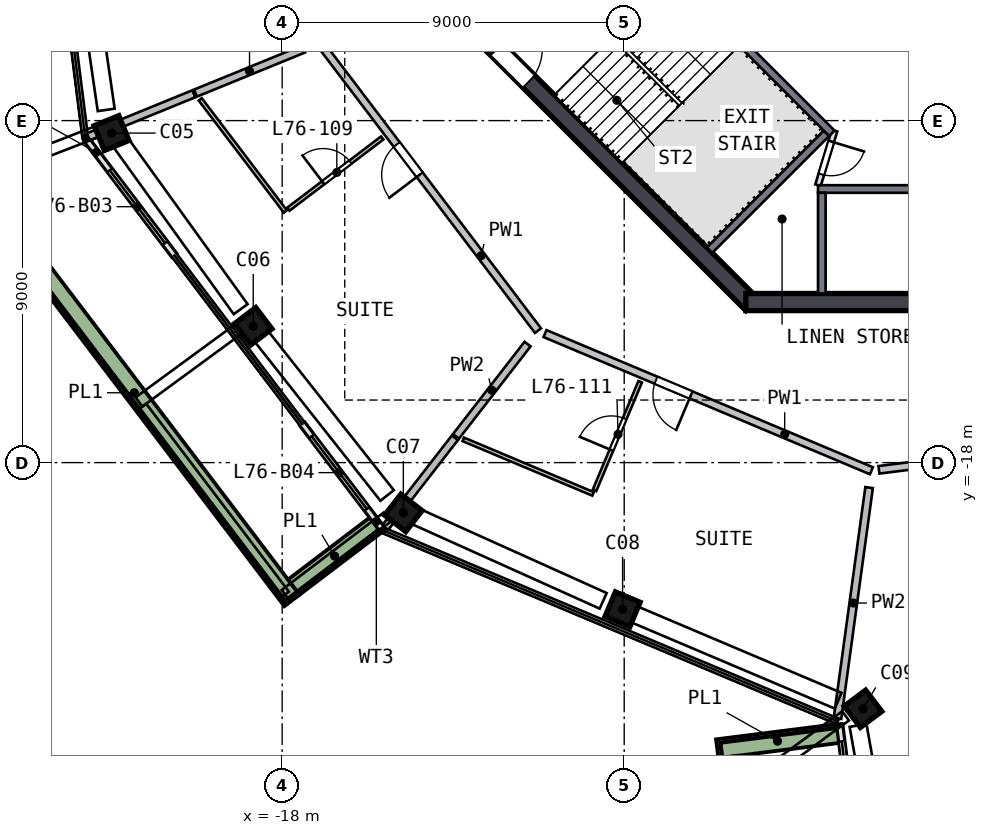
"""IFC4 building model, lengths in metres.
Left out: names, types, materials, properties, quantities, classifications, styles, units other than length and angle.
Written with IfcOpenShell. Run it as: python <this file> out.ifc"""

import sys

from ifc_helpers import new_model, si_unit, direction, frame, frame_2d, origin, origin_2d, place, context, subcontext, project, spatial, rectangle, extrude, element, fill, save


model = new_model("IFC4")
c1 = context("Model", 3, precision=1e-05, world=origin(), true_north=direction((0.0, 1.0)))
c2 = subcontext(c1, "Body", "Model", "MODEL_VIEW")
j1 = project(units=[si_unit("LENGTHUNIT", "METRE"), si_unit("PLANEANGLEUNIT", "RADIAN")], contexts=[c1])
p1 = place(None, origin())
s1 = spatial("IfcSite", under=j1, at=p1, CompositionType="ELEMENT")
p2 = place(p1, origin())
s2 = spatial("IfcBuilding", under=s1, at=p2, CompositionType="ELEMENT")
p3 = place(p2, frame((0.0, 0.0, 306.5)))
s3 = spatial("IfcBuildingStorey", under=s2, at=p3, CompositionType="ELEMENT", Elevation=306.5)
p4 = place(p3, frame((-22.543, -9.2, 0.0), z_axis=(0.044699629, -0.106807786, 0.993274403), x_axis=(-0.375670486, 0.91949262, 0.115779992)))
e1 = element("IfcColumn", 1, at=p4, inside=s3, PredefinedType="COLUMN", context=c2, shape_type="SweptSolid", body=[
    extrude(rectangle(XDim=0.7, YDim=0.7, at=origin_2d()), origin(), (0.0, 0.0, 1.0), 3.211),
])
p5 = place(p3, frame((-18.844, -14.304, 0.0), z_axis=(0.068747968, -0.089052954, 0.993651492), x_axis=(0.600506692, -0.791666534, -0.112498053)))
e2 = element("IfcColumn", 2, at=p5, inside=s3, PredefinedType="COLUMN", context=c2, shape_type="SweptSolid", body=[
    extrude(rectangle(XDim=0.7, YDim=0.7, at=origin_2d()), origin(), (0.0, 0.0, 1.0), 3.21),
])
p6 = place(p3, frame((-14.923, -19.239, 0.0), z_axis=(0.092135676, -0.07016603, 0.993271235), x_axis=(-0.785076565, 0.608476364, 0.11580717)))
e3 = element("IfcColumn", 3, at=p6, inside=s3, PredefinedType="COLUMN", context=c2, shape_type="SweptSolid", body=[
    extrude(rectangle(XDim=0.7, YDim=0.7, at=origin_2d()), origin(), (0.0, 0.0, 1.0), 3.212),
])
p7 = place(p3, frame((-9.168, -21.81, 0.0), z_axis=(0.104110118, -0.042739143, 0.993647044), x_axis=(0.915971714, -0.385137856, -0.11253733)))
e4 = element("IfcColumn", 4, at=p7, inside=s3, PredefinedType="COLUMN", context=c2, shape_type="SweptSolid", body=[
    extrude(rectangle(XDim=0.7, YDim=0.7, at=origin_2d()), origin(), (0.0, 0.0, 1.0), 3.21),
])
p8 = place(p3, frame((-2.856, -24.463, 0.0), z_axis=(0.116368879, -0.012617396, 0.993125916), x_axis=(-0.59706483, 0.798183786, 0.08010139)))
e5 = element("IfcColumn", 5, at=p8, inside=s3, PredefinedType="COLUMN", context=c2, shape_type="SweptSolid", body=[
    extrude(rectangle(XDim=0.7, YDim=0.7, at=origin_2d()), origin(), (0.0, 0.0, 1.0), 3.212),
])
p9 = place(p3, frame((-13.841, -5.64, 0.0), z_axis=(0.0, 0.0, 1.0), x_axis=(0.707106781, -0.707106781, 0.0)))
e6 = element("IfcWall", 6, at=p9, inside=s3, PredefinedType="SHEAR", context=c2, shape_type="SweptSolid", body=[
    extrude(rectangle(XDim=11.598, YDim=0.45, at=frame_2d((5.799, 0.0))), origin(), (0.0, 0.0, 1.0), 3.5),
])
p10 = place(p9, frame((2.099, 0.0, 0.0)))
e7 = element("IfcOpeningElement", 7, at=p10, cuts=e6, PredefinedType="OPENING", context=c2, shape_type="SweptSolid", body=[
    extrude(rectangle(XDim=1.2, YDim=2.1, at=frame_2d((0.6, 1.05))), frame((0.0, 0.235, 0.0), z_axis=(0.0, -1.0, 0.0), x_axis=(1.0, 0.0, 0.0)), (0.0, 0.0, 1.0), 0.47),
])
p11 = place(p3, frame((-5.799, -13.775, 0.0), z_axis=(0.0, 0.0, 1.0), x_axis=(1.0, 0.0, 0.0)))
e8 = element("IfcWall", 8, at=p11, inside=s3, PredefinedType="SHEAR", context=c2, shape_type="SweptSolid", body=[
    extrude(rectangle(XDim=11.598, YDim=0.45, at=frame_2d((5.799, 0.0))), origin(), (0.0, 0.0, 1.0), 3.5),
])
p12 = place(p3, frame((-23.132, -9.524, 0.0), z_axis=(0.0, 0.0, 1.0), x_axis=(0.604631987, -0.796504966, 0.0)))
e9 = element("IfcWall", 9, at=p12, inside=s3, PredefinedType="SOLIDWALL", context=c2, shape_type="SweptSolid", body=[
    extrude(rectangle(XDim=3.787, YDim=0.15, at=frame_2d((1.893, 0.0))), origin(), (0.0, 0.0, 1.0), 2.525),
])
p13 = place(p12, frame((0.987, 0.0, 0.0)))
e10 = element("IfcOpeningElement", 10, at=p13, cuts=e9, PredefinedType="OPENING", context=c2, shape_type="SweptSolid", body=[
    extrude(rectangle(XDim=2.4, YDim=2.4, at=frame_2d((1.2, 1.2))), frame((0.0, 0.085, 0.0), z_axis=(0.0, -1.0, 0.0), x_axis=(1.0, 0.0, 0.0)), (0.0, 0.0, 1.0), 0.17),
])
p14 = place(p3, frame((-17.465, -16.989, 0.0), z_axis=(0.0, 0.0, 1.0), x_axis=(0.604640614, -0.796498417, 0.0)))
e11 = element("IfcWall", 11, at=p14, inside=s3, PredefinedType="SOLIDWALL", context=c2, shape_type="SweptSolid", body=[
    extrude(rectangle(XDim=3.427, YDim=0.15, at=frame_2d((1.713, 0.0))), origin(), (0.0, 0.0, 1.0), 2.525),
])
p15 = place(p14, frame((0.4, 0.0, 0.0)))
e12 = element("IfcOpeningElement", 12, at=p15, cuts=e11, PredefinedType="OPENING", context=c2, shape_type="SweptSolid", body=[
    extrude(rectangle(XDim=2.4, YDim=2.4, at=frame_2d((1.2, 1.2))), frame((0.0, 0.085, 0.0), z_axis=(0.0, -1.0, 0.0), x_axis=(1.0, 0.0, 0.0)), (0.0, 0.0, 1.0), 0.17),
])
p16 = place(p3, frame((-3.325, -24.942, 0.0), z_axis=(0.0, 0.0, 1.0), x_axis=(0.125349211, -0.992112683, 0.0)))
e13 = element("IfcWall", 13, at=p16, inside=s3, PredefinedType="SOLIDWALL", context=c2, shape_type="SweptSolid", body=[
    extrude(rectangle(XDim=3.2, YDim=0.15, at=frame_2d((1.6, 0.0))), origin(), (0.0, 0.0, 1.0), 2.525),
])
p17 = place(p16, frame((0.4, 0.0, 0.0)))
e14 = element("IfcOpeningElement", 14, at=p17, cuts=e13, PredefinedType="OPENING", context=c2, shape_type="SweptSolid", body=[
    extrude(rectangle(XDim=2.4, YDim=2.4, at=frame_2d((1.2, 1.2))), frame((0.0, 0.085, 0.0), z_axis=(0.0, -1.0, 0.0), x_axis=(1.0, 0.0, 0.0)), (0.0, 0.0, 1.0), 0.17),
])
p18 = place(p3, frame((-26.04, -10.697, 0.0), z_axis=(0.0, 0.0, 1.0), x_axis=(0.604595551, -0.796532623, 0.0)))
e15 = element("IfcWall", 15, at=p18, inside=s3, PredefinedType="SOLIDWALL", context=c2, shape_type="SweptSolid", body=[
    extrude(rectangle(XDim=13.723, YDim=0.5, at=frame_2d((6.862, 0.0))), origin(), (0.0, 0.0, 1.0), 0.7),
])
p19 = place(p3, frame((-17.694, -21.277, 0.0), z_axis=(0.0, 0.0, 1.0), x_axis=(0.79653505, 0.604592354, 0.0)))
e16 = element("IfcWall", 16, at=p19, inside=s3, PredefinedType="SOLIDWALL", context=c2, shape_type="SweptSolid", body=[
    extrude(rectangle(XDim=2.699, YDim=0.5, at=frame_2d((1.35, 0.0))), origin(), (0.0, 0.0, 1.0), 0.7),
])
p20 = place(p3, frame((-3.378, -25.13, 0.0), z_axis=(0.0, 0.0, 1.0), x_axis=(-0.992117376, -0.125312056, 0.0)))
e17 = element("IfcWall", 17, at=p20, inside=s3, PredefinedType="SOLIDWALL", context=c2, shape_type="SweptSolid", body=[
    extrude(rectangle(XDim=3.199, YDim=0.5, at=frame_2d((1.6, 0.0))), origin(), (0.0, 0.0, 1.0), 0.7),
])
p21 = place(p3, frame((-3.9, -10.8, 0.0), z_axis=(0.0, 0.0, 1.0), x_axis=(1.0, 0.0, 0.0)))
e18 = element("IfcWall", 18, at=p21, inside=s3, PredefinedType="SOLIDWALL", context=c2, shape_type="SweptSolid", body=[
    extrude(rectangle(XDim=7.8, YDim=0.2, at=frame_2d((3.9, 0.0))), origin(), (0.0, 0.0, 1.0), 3.19),
])
p22 = place(p21, frame((3.45, 0.0, 0.0)))
e19 = element("IfcOpeningElement", 19, at=p22, cuts=e18, PredefinedType="OPENING", context=c2, shape_type="SweptSolid", body=[
    extrude(rectangle(XDim=0.9, YDim=2.1, at=frame_2d((0.45, 1.05))), frame((0.0, 0.11, 0.0), z_axis=(0.0, -1.0, 0.0), x_axis=(1.0, 0.0, 0.0)), (0.0, 0.0, 1.0), 0.22),
])
p23 = place(p3, frame((-3.8, -10.9, 0.0), z_axis=(0.0, 0.0, 1.0), x_axis=(0.0, -1.0, 0.0)))
e20 = element("IfcWall", 20, at=p23, inside=s3, PredefinedType="SOLIDWALL", context=c2, shape_type="SweptSolid", body=[
    extrude(rectangle(XDim=2.65, YDim=0.2, at=frame_2d((1.325, 0.0))), origin(), (0.0, 0.0, 1.0), 3.19),
])
p24 = place(p3, frame((-3.535, -9.334, 0.0), z_axis=(0.0, 0.0, 1.0), x_axis=(-0.707120946, 0.707092617, 0.0)))
e21 = element("IfcWall", 21, at=p24, inside=s3, PredefinedType="SOLIDWALL", context=c2, shape_type="SweptSolid", body=[
    extrude(rectangle(XDim=8.618, YDim=0.2, at=frame_2d((4.309, 0.0))), origin(), (0.0, 0.0, 1.0), 3.19),
])
p25 = place(p24, frame((6.6, 0.0, 0.0)))
e22 = element("IfcOpeningElement", 22, at=p25, cuts=e21, PredefinedType="OPENING", context=c2, shape_type="SweptSolid", body=[
    extrude(rectangle(XDim=1.2, YDim=2.1, at=frame_2d((0.6, 1.05))), frame((0.0, 0.11, 0.0), z_axis=(0.0, -1.0, 0.0), x_axis=(1.0, 0.0, 0.0)), (0.0, 0.0, 1.0), 0.22),
])
p26 = place(p3, frame((-3.677, -9.334, 0.0), z_axis=(0.0, 0.0, 1.0), x_axis=(-0.707106781, -0.707106781, 0.0)))
e23 = element("IfcWall", 23, at=p26, inside=s3, PredefinedType="SOLIDWALL", context=c2, shape_type="SweptSolid", body=[
    extrude(rectangle(XDim=4.35, YDim=0.2, at=frame_2d((2.175, 0.0))), origin(), (0.0, 0.0, 1.0), 3.19),
])
p27 = place(p3, frame((-3.465, -9.263, 0.0), z_axis=(0.0, 0.0, 1.0), x_axis=(-0.289808785, -0.957084567, 0.0)))
e24 = element("IfcWall", 24, at=p27, inside=s3, PredefinedType="PARTITIONING", context=c2, shape_type="SweptSolid", body=[
    extrude(rectangle(XDim=1.501, YDim=0.15, at=frame_2d((0.75, 0.0))), origin(), (0.0, 0.0, 1.0), 3.19),
])
p28 = place(p27, frame((0.301, 0.0, 0.0)))
e25 = element("IfcOpeningElement", 25, at=p28, cuts=e24, PredefinedType="OPENING", context=c2, shape_type="SweptSolid", body=[
    extrude(rectangle(XDim=0.9, YDim=2.1, at=frame_2d((0.45, 1.05))), frame((0.0, 0.085, 0.0), z_axis=(0.0, -1.0, 0.0), x_axis=(1.0, 0.0, 0.0)), (0.0, 0.0, 1.0), 0.17),
])
p29 = place(p3, frame((-11.268, -14.527, 0.0), z_axis=(0.0, 0.0, 1.0), x_axis=(-0.604585485, 0.796540263, 0.0)))
e26 = element("IfcWall", 26, at=p29, inside=s3, PredefinedType="SOLIDWALL", context=c2, shape_type="SweptSolid", body=[
    extrude(rectangle(XDim=9.316, YDim=0.2, at=frame_2d((4.658, 0.0))), origin(), (0.0, 0.0, 1.0), 3.19),
])
p30 = place(p29, frame((5.15, 0.0, 0.0)))
e27 = element("IfcOpeningElement", 27, at=p30, cuts=e26, PredefinedType="OPENING", context=c2, shape_type="SweptSolid", body=[
    extrude(rectangle(XDim=1.0, YDim=2.1, at=frame_2d((0.5, 1.05))), frame((0.0, 0.11, 0.0), z_axis=(0.0, -1.0, 0.0), x_axis=(1.0, 0.0, 0.0)), (0.0, 0.0, 1.0), 0.22),
])
p31 = place(p3, frame((-2.495, -18.215, 0.0), z_axis=(0.0, 0.0, 1.0), x_axis=(-0.921862121, 0.387518038, 0.0)))
e28 = element("IfcWall", 28, at=p31, inside=s3, PredefinedType="SOLIDWALL", context=c2, shape_type="SweptSolid", body=[
    extrude(rectangle(XDim=9.317, YDim=0.2, at=frame_2d((4.658, 0.0))), origin(), (0.0, 0.0, 1.0), 3.19),
])
p32 = place(p31, frame((5.15, 0.0, 0.0)))
e29 = element("IfcOpeningElement", 29, at=p32, cuts=e28, PredefinedType="OPENING", context=c2, shape_type="SweptSolid", body=[
    extrude(rectangle(XDim=1.0, YDim=2.1, at=frame_2d((0.5, 1.05))), frame((0.0, 0.11, 0.0), z_axis=(0.0, -1.0, 0.0), x_axis=(1.0, 0.0, 0.0)), (0.0, 0.0, 1.0), 0.22),
])
p33 = place(p3, frame((6.947, -17.022, 0.0), z_axis=(0.0, 0.0, 1.0), x_axis=(-0.992114148, -0.125337611, 0.0)))
e30 = element("IfcWall", 30, at=p33, inside=s3, PredefinedType="SOLIDWALL", context=c2, shape_type="SweptSolid", body=[
    extrude(rectangle(XDim=9.317, YDim=0.2, at=frame_2d((4.658, 0.0))), origin(), (0.0, 0.0, 1.0), 3.19),
])
p34 = place(p33, frame((3.834, 0.0, 0.0)))
e31 = element("IfcOpeningElement", 31, at=p34, cuts=e30, PredefinedType="OPENING", context=c2, shape_type="SweptSolid", body=[
    extrude(rectangle(XDim=1.8, YDim=2.1, at=frame_2d((0.9, 1.05))), frame((0.0, 0.11, 0.0), z_axis=(0.0, -1.0, 0.0), x_axis=(1.0, 0.0, 0.0)), (0.0, 0.0, 1.0), 0.22),
])
p35 = place(p3, frame((-20.325, -8.295, 0.0), z_axis=(0.0, 0.0, 1.0), x_axis=(-0.925893946, -0.377783538, 0.0)))
e32 = element("IfcWall", 32, at=p35, inside=s3, PredefinedType="SOLIDWALL", context=c2, shape_type="SweptSolid", body=[
    extrude(rectangle(XDim=3.011, YDim=0.2, at=frame_2d((1.506, 0.0))), origin(), (0.0, 0.0, 1.0), 3.19),
])
p36 = place(p3, frame((-17.436, -7.115, 0.0), z_axis=(0.0, 0.0, 1.0), x_axis=(-0.925880525, -0.377816427, 0.0)))
e33 = element("IfcWall", 33, at=p36, inside=s3, PredefinedType="SOLIDWALL", context=c2, shape_type="SweptSolid", body=[
    extrude(rectangle(XDim=3.074, YDim=0.2, at=frame_2d((1.537, 0.0))), origin(), (0.0, 0.0, 1.0), 3.19),
])
p37 = place(p3, frame((-13.455, -17.346, 0.0), z_axis=(0.0, 0.0, 1.0), x_axis=(-0.612918568, -0.79014608, 0.0)))
e34 = element("IfcWall", 34, at=p37, inside=s3, PredefinedType="SOLIDWALL", context=c2, shape_type="SweptSolid", body=[
    extrude(rectangle(XDim=3.011, YDim=0.2, at=frame_2d((1.506, 0.0))), origin(), (0.0, 0.0, 1.0), 3.19),
])
p38 = place(p3, frame((-11.542, -14.88, 0.0), z_axis=(0.0, 0.0, 1.0), x_axis=(-0.612879169, -0.790176641, 0.0)))
e35 = element("IfcWall", 35, at=p38, inside=s3, PredefinedType="SOLIDWALL", context=c2, shape_type="SweptSolid", body=[
    extrude(rectangle(XDim=3.075, YDim=0.2, at=frame_2d((1.538, 0.0))), origin(), (0.0, 0.0, 1.0), 3.19),
])
p39 = place(p3, frame((-3.388, -24.733, 0.0), z_axis=(0.0, 0.0, 1.0), x_axis=(0.135683489, 0.990752235, 0.0)))
e36 = element("IfcWall", 36, at=p39, inside=s3, PredefinedType="SOLIDWALL", context=c2, shape_type="SweptSolid", body=[
    extrude(rectangle(XDim=6.132, YDim=0.2, at=frame_2d((3.066, 0.0))), origin(), (0.0, 0.0, 1.0), 3.19),
])
p40 = place(p3, frame((-17.916, -11.392, 0.0), z_axis=(0.0, 0.0, 1.0), x_axis=(-0.604630261, 0.796506276, 0.0)))
e37 = element("IfcWall", 37, at=p40, inside=s3, PredefinedType="PARTITIONING", context=c2, shape_type="SweptSolid", body=[
    extrude(rectangle(XDim=3.704, YDim=0.1, at=frame_2d((1.852, 0.0))), origin(), (0.0, 0.0, 1.0), 3.19),
])
p41 = place(p3, frame((-17.837, -11.331, 0.0), z_axis=(0.0, 0.0, 1.0), x_axis=(0.796527788, 0.604601921, 0.0)))
e38 = element("IfcWall", 38, at=p41, inside=s3, PredefinedType="PARTITIONING", context=c2, shape_type="SweptSolid", body=[
    extrude(rectangle(XDim=3.1, YDim=0.1, at=frame_2d((1.55, 0.0))), origin(), (0.0, 0.0, 1.0), 3.19),
])
p42 = place(p41, frame((1.15, 0.0, 0.0)))
e39 = element("IfcOpeningElement", 39, at=p42, cuts=e38, PredefinedType="OPENING", context=c2, shape_type="SweptSolid", body=[
    extrude(rectangle(XDim=0.9, YDim=2.1, at=frame_2d((0.45, 1.05))), frame((0.0, 0.06, 0.0), z_axis=(0.0, -1.0, 0.0), x_axis=(1.0, 0.0, 0.0)), (0.0, 0.0, 1.0), 0.12),
])
p43 = place(p3, frame((-9.82, -18.824, 0.0), z_axis=(0.0, 0.0, 1.0), x_axis=(-0.921867226, 0.387505893, 0.0)))
e40 = element("IfcWall", 40, at=p43, inside=s3, PredefinedType="PARTITIONING", context=c2, shape_type="SweptSolid", body=[
    extrude(rectangle(XDim=3.704, YDim=0.1, at=frame_2d((1.852, 0.0))), origin(), (0.0, 0.0, 1.0), 3.19),
])
p44 = place(p3, frame((-9.781, -18.731, 0.0), z_axis=(0.0, 0.0, 1.0), x_axis=(0.3875605, 0.92184427, 0.0)))
e41 = element("IfcWall", 41, at=p44, inside=s3, PredefinedType="PARTITIONING", context=c2, shape_type="SweptSolid", body=[
    extrude(rectangle(XDim=3.1, YDim=0.1, at=frame_2d((1.55, 0.0))), origin(), (0.0, 0.0, 1.0), 3.19),
])
p45 = place(p44, frame((1.15, 0.0, 0.0)))
e42 = element("IfcOpeningElement", 42, at=p45, cuts=e41, PredefinedType="OPENING", context=c2, shape_type="SweptSolid", body=[
    extrude(rectangle(XDim=0.9, YDim=2.1, at=frame_2d((0.45, 1.05))), frame((0.0, 0.06, 0.0), z_axis=(0.0, -1.0, 0.0), x_axis=(1.0, 0.0, 0.0)), (0.0, 0.0, 1.0), 0.12),
])
p46 = place(p13, origin())
e43 = element("IfcDoor", 43, at=p46, inside=s3, OperationType="SLIDING_TO_LEFT", PredefinedType="DOOR", context=c2, shape_type="SweptSolid", body=[
    extrude(rectangle(XDim=2.4, YDim=2.4, at=frame_2d((1.2, 1.2))), frame((0.0, 0.025, 0.0), z_axis=(0.0, -1.0, 0.0), x_axis=(1.0, 0.0, 0.0)), (0.0, 0.0, 1.0), 0.05),
])
fill(e10, e43)
p47 = place(p15, origin())
e44 = element("IfcDoor", 44, at=p47, inside=s3, OperationType="SLIDING_TO_RIGHT", PredefinedType="DOOR", context=c2, shape_type="SweptSolid", body=[
    extrude(rectangle(XDim=2.4, YDim=2.4, at=frame_2d((1.2, 1.2))), frame((0.0, 0.025, 0.0), z_axis=(0.0, -1.0, 0.0), x_axis=(1.0, 0.0, 0.0)), (0.0, 0.0, 1.0), 0.05),
])
fill(e12, e44)
p48 = place(p17, origin())
e45 = element("IfcDoor", 45, at=p48, inside=s3, OperationType="SLIDING_TO_LEFT", PredefinedType="DOOR", context=c2, shape_type="SweptSolid", body=[
    extrude(rectangle(XDim=2.4, YDim=2.4, at=frame_2d((1.2, 1.2))), frame((0.0, 0.025, 0.0), z_axis=(0.0, -1.0, 0.0), x_axis=(1.0, 0.0, 0.0)), (0.0, 0.0, 1.0), 0.05),
])
fill(e14, e45)
p49 = place(p10, origin())
e46 = element("IfcDoor", 46, at=p49, inside=s3, OperationType="SINGLE_SWING_LEFT", PredefinedType="DOOR", context=c2, shape_type="SweptSolid", body=[
    extrude(rectangle(XDim=1.2, YDim=2.1, at=frame_2d((0.6, 1.05))), frame((0.0, 0.025, 0.0), z_axis=(0.0, -1.0, 0.0), x_axis=(1.0, 0.0, 0.0)), (0.0, 0.0, 1.0), 0.05),
])
fill(e7, e46)
p50 = place(p28, origin())
e47 = element("IfcDoor", 47, at=p50, inside=s3, OperationType="SINGLE_SWING_LEFT", PredefinedType="DOOR", context=c2, shape_type="SweptSolid", body=[
    extrude(rectangle(XDim=0.9, YDim=2.1, at=frame_2d((0.45, 1.05))), frame((0.0, 0.025, 0.0), z_axis=(0.0, -1.0, 0.0), x_axis=(1.0, 0.0, 0.0)), (0.0, 0.0, 1.0), 0.05),
])
fill(e25, e47)
p51 = place(p30, origin())
e48 = element("IfcDoor", 48, at=p51, inside=s3, OperationType="SINGLE_SWING_LEFT", PredefinedType="DOOR", context=c2, shape_type="SweptSolid", body=[
    extrude(rectangle(XDim=1.0, YDim=2.1, at=frame_2d((0.5, 1.05))), frame((0.0, 0.025, 0.0), z_axis=(0.0, -1.0, 0.0), x_axis=(1.0, 0.0, 0.0)), (0.0, 0.0, 1.0), 0.05),
])
fill(e27, e48)
p52 = place(p42, origin())
e49 = element("IfcDoor", 49, at=p52, inside=s3, OperationType="SINGLE_SWING_LEFT", PredefinedType="DOOR", context=c2, shape_type="SweptSolid", body=[
    extrude(rectangle(XDim=0.9, YDim=2.1, at=frame_2d((0.45, 1.05))), frame((0.0, 0.025, 0.0), z_axis=(0.0, -1.0, 0.0), x_axis=(1.0, 0.0, 0.0)), (0.0, 0.0, 1.0), 0.05),
])
fill(e39, e49)
p53 = place(p32, origin())
e50 = element("IfcDoor", 50, at=p53, inside=s3, OperationType="SINGLE_SWING_LEFT", PredefinedType="DOOR", context=c2, shape_type="SweptSolid", body=[
    extrude(rectangle(XDim=1.0, YDim=2.1, at=frame_2d((0.5, 1.05))), frame((0.0, 0.025, 0.0), z_axis=(0.0, -1.0, 0.0), x_axis=(1.0, 0.0, 0.0)), (0.0, 0.0, 1.0), 0.05),
])
fill(e29, e50)
p54 = place(p45, origin())
e51 = element("IfcDoor", 51, at=p54, inside=s3, OperationType="SINGLE_SWING_LEFT", PredefinedType="DOOR", context=c2, shape_type="SweptSolid", body=[
    extrude(rectangle(XDim=0.9, YDim=2.1, at=frame_2d((0.45, 1.05))), frame((0.0, 0.025, 0.0), z_axis=(0.0, -1.0, 0.0), x_axis=(1.0, 0.0, 0.0)), (0.0, 0.0, 1.0), 0.05),
])
fill(e42, e51)
save(model, sys.argv[1])
